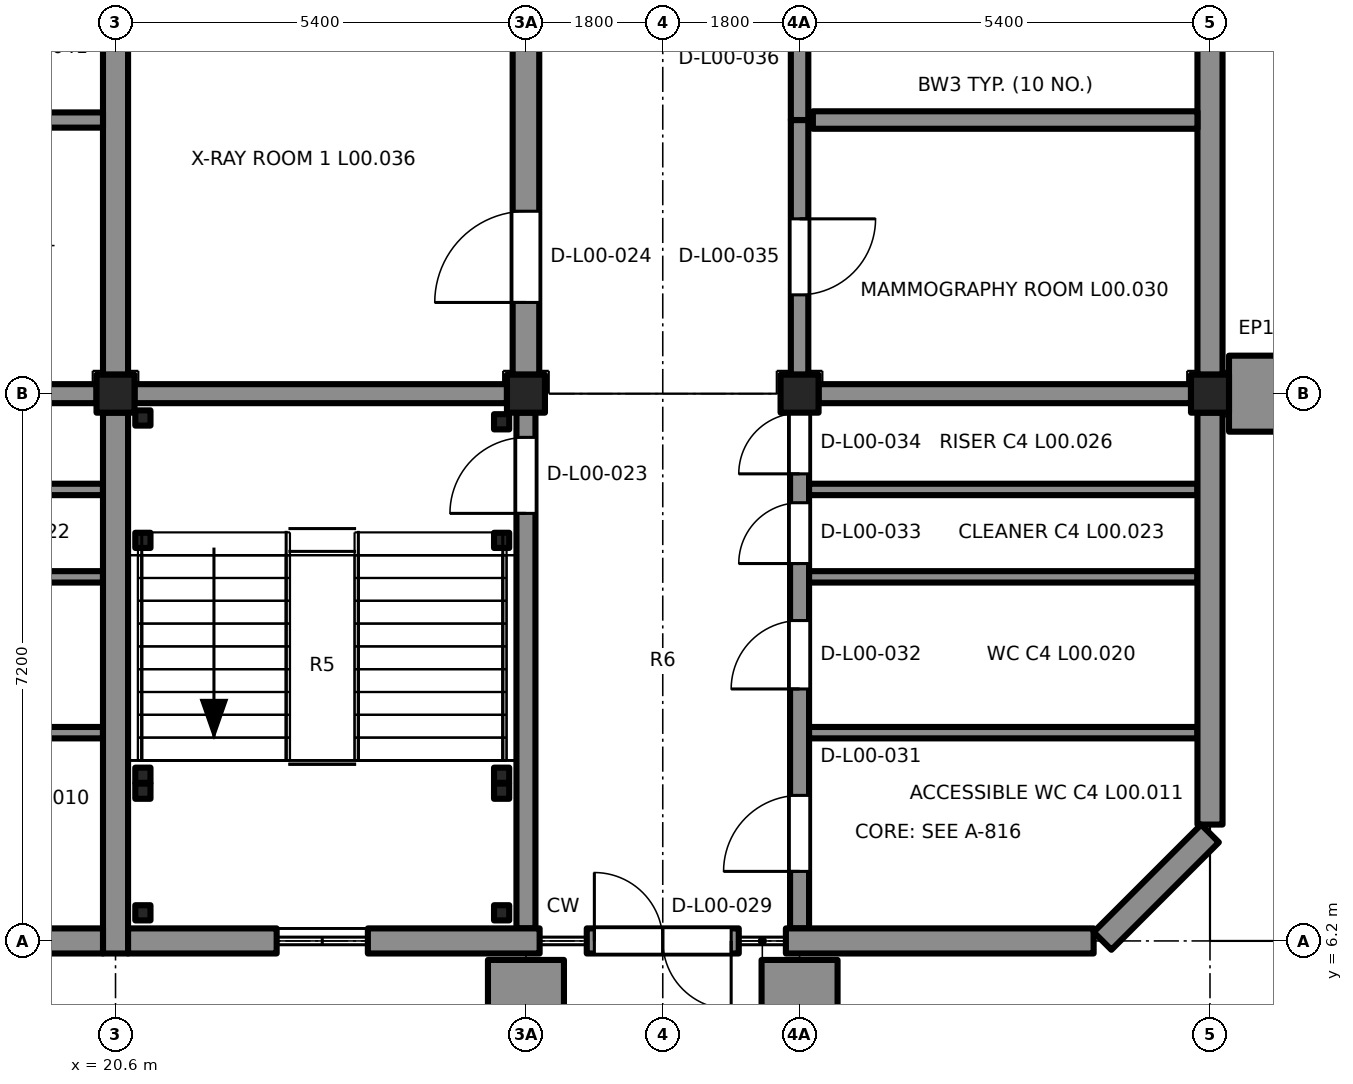
"""IFC4 building model, lengths in metres.
Left out: names, types, materials, properties, quantities, classifications, styles, units other than length and angle.
Written with IfcOpenShell. Run it as: python <this file> out.ifc"""

import sys

from ifc_helpers import new_model, si_unit, direction, frame, frame_2d, origin, origin_2d, place, context, subcontext, project, spatial, rectangle, extrude, element, fill, save


model = new_model("IFC4")
c1 = context("Model", 3, precision=1e-05, world=origin(), true_north=direction((0.0, 1.0)))
c2 = subcontext(c1, "Body", "Model", "MODEL_VIEW")
j1 = project(units=[si_unit("LENGTHUNIT", "METRE"), si_unit("PLANEANGLEUNIT", "RADIAN")], contexts=[c1])
p1 = place(None, origin())
s1 = spatial("IfcSite", under=j1, at=p1, CompositionType="ELEMENT")
p2 = place(p1, origin())
s2 = spatial("IfcBuilding", under=s1, at=p2, CompositionType="ELEMENT")
p3 = place(p2, origin())
s3 = spatial("IfcBuildingStorey", under=s2, at=p3, CompositionType="ELEMENT", Elevation=0.0)
for number, where, z_axis, x_axis in (
    (1, (20.6, 13.4, -0.2), (0.0, 0.0, 1.0), (1.0, 0.0, 0.0)),
    (2, (26.0, 13.4, -0.2), (0.0, 0.0, 1.0), (1.0, 0.0, 0.0)),
    (3, (29.6, 13.4, -0.2), (0.0, 0.0, 1.0), (1.0, 0.0, 0.0)),
    (4, (35.0, 13.4, -0.2), (0.0, 0.0, 1.0), (1.0, 0.0, 0.0)),
):
    element("IfcColumn", number, at=place(p3, frame(where, z_axis=z_axis, x_axis=x_axis)), inside=s3, PredefinedType="COLUMN", context=c2, shape_type="SweptSolid", body=[
        extrude(rectangle(XDim=0.5, YDim=0.5, at=origin_2d()), origin(), (0.0, 0.0, 1.0), 5.45),
    ])
p4 = place(p3, frame((15.45, 13.4, 0.0), z_axis=(0.0, 0.0, 1.0), x_axis=(1.0, 0.0, 0.0)))
e5 = element("IfcWall", 5, at=p4, inside=s3, PredefinedType="SHEAR", context=c2, shape_type="SweptSolid", body=[
    extrude(rectangle(XDim=4.9, YDim=0.25, at=frame_2d((2.45, 0.0))), origin(), (0.0, 0.0, 1.0), 6.05),
])
for number, where, z_axis, x_axis in (
    (6, (15.325, 8.94, 0.0), (0.0, 0.0, 1.0), (1.0, 0.0, 0.0)),
    (7, (15.325, 10.99, 0.0), (0.0, 0.0, 1.0), (1.0, 0.0, 0.0)),
    (8, (15.325, 12.14, 0.0), (0.0, 0.0, 1.0), (1.0, 0.0, 0.0)),
):
    element("IfcWall", number, at=place(p3, frame(where, z_axis=z_axis, x_axis=x_axis)), inside=s3, PredefinedType="PARTITIONING", context=c2, shape_type="SweptSolid", body=[
        extrude(rectangle(XDim=5.11, YDim=0.15, at=frame_2d((2.555, 0.0))), origin(), (0.0, 0.0, 1.0), 6.05),
    ])
p5 = place(p3, frame((26.0, 6.365, 0.0), z_axis=(0.0, 0.0, 1.0), x_axis=(0.0, 1.0, 0.0)))
e9 = element("IfcWall", 9, at=p5, inside=s3, PredefinedType="SHEAR", context=c2, shape_type="SweptSolid", body=[
    extrude(rectangle(XDim=6.785, YDim=0.25, at=frame_2d((3.393, 0.0))), origin(), (0.0, 0.0, 1.0), 6.05),
])
p6 = place(p5, frame((5.46, 0.0, 0.0)))
e10 = element("IfcOpeningElement", 10, at=p6, cuts=e9, PredefinedType="OPENING", context=c2, shape_type="SweptSolid", body=[
    extrude(rectangle(XDim=1.0, YDim=2.1, at=frame_2d((0.5, 1.05))), frame((0.0, 0.135, 0.0), z_axis=(0.0, -1.0, 0.0), x_axis=(1.0, 0.0, 0.0)), (0.0, 0.0, 1.0), 0.27),
])
p7 = place(p3, frame((20.85, 13.4, 0.0), z_axis=(0.0, 0.0, 1.0), x_axis=(1.0, 0.0, 0.0)))
e11 = element("IfcWall", 11, at=p7, inside=s3, PredefinedType="SHEAR", context=c2, shape_type="SweptSolid", body=[
    extrude(rectangle(XDim=4.9, YDim=0.25, at=frame_2d((2.45, 0.0))), origin(), (0.0, 0.0, 1.0), 6.05),
])
p8 = place(p3, frame((29.6, 6.365, 0.0), z_axis=(0.0, 0.0, 1.0), x_axis=(0.0, 1.0, 0.0)))
e12 = element("IfcWall", 12, at=p8, inside=s3, PredefinedType="SHEAR", context=c2, shape_type="SweptSolid", body=[
    extrude(rectangle(XDim=6.785, YDim=0.25, at=frame_2d((3.393, 0.0))), origin(), (0.0, 0.0, 1.0), 6.05),
])
p9 = place(p8, frame((0.75, 0.0, 0.0)))
e13 = element("IfcOpeningElement", 13, at=p9, cuts=e12, PredefinedType="OPENING", context=c2, shape_type="SweptSolid", body=[
    extrude(rectangle(XDim=1.0, YDim=2.1, at=frame_2d((0.5, 1.05))), frame((0.0, 0.135, 0.0), z_axis=(0.0, -1.0, 0.0), x_axis=(1.0, 0.0, 0.0)), (0.0, 0.0, 1.0), 0.27),
])
p10 = place(p8, frame((3.15, 0.0, 0.0)))
e14 = element("IfcOpeningElement", 14, at=p10, cuts=e12, PredefinedType="OPENING", context=c2, shape_type="SweptSolid", body=[
    extrude(rectangle(XDim=0.9, YDim=2.1, at=frame_2d((0.45, 1.05))), frame((0.0, 0.135, 0.0), z_axis=(0.0, -1.0, 0.0), x_axis=(1.0, 0.0, 0.0)), (0.0, 0.0, 1.0), 0.27),
])
p11 = place(p8, frame((4.8, 0.0, 0.0)))
e15 = element("IfcOpeningElement", 15, at=p11, cuts=e12, PredefinedType="OPENING", context=c2, shape_type="SweptSolid", body=[
    extrude(rectangle(XDim=0.8, YDim=2.1, at=frame_2d((0.4, 1.05))), frame((0.0, 0.135, 0.0), z_axis=(0.0, -1.0, 0.0), x_axis=(1.0, 0.0, 0.0)), (0.0, 0.0, 1.0), 0.27),
])
p12 = place(p8, frame((5.98, 0.0, 0.0)))
e16 = element("IfcOpeningElement", 16, at=p12, cuts=e12, PredefinedType="OPENING", context=c2, shape_type="SweptSolid", body=[
    extrude(rectangle(XDim=0.8, YDim=2.1, at=frame_2d((0.4, 1.05))), frame((0.0, 0.135, 0.0), z_axis=(0.0, -1.0, 0.0), x_axis=(1.0, 0.0, 0.0)), (0.0, 0.0, 1.0), 0.27),
])
p13 = place(p3, frame((29.85, 13.4, 0.0), z_axis=(0.0, 0.0, 1.0), x_axis=(1.0, 0.0, 0.0)))
e17 = element("IfcWall", 17, at=p13, inside=s3, PredefinedType="SHEAR", context=c2, shape_type="SweptSolid", body=[
    extrude(rectangle(XDim=4.9, YDim=0.25, at=frame_2d((2.45, 0.0))), origin(), (0.0, 0.0, 1.0), 6.05),
])
for number, where, z_axis, x_axis in (
    (18, (29.725, 8.94, 0.0), (0.0, 0.0, 1.0), (1.0, 0.0, 0.0)),
    (19, (29.725, 10.99, 0.0), (0.0, 0.0, 1.0), (1.0, 0.0, 0.0)),
    (20, (29.725, 12.14, 0.0), (0.0, 0.0, 1.0), (1.0, 0.0, 0.0)),
):
    element("IfcWall", number, at=place(p3, frame(where, z_axis=z_axis, x_axis=x_axis)), inside=s3, PredefinedType="PARTITIONING", context=c2, shape_type="SweptSolid", body=[
        extrude(rectangle(XDim=5.11, YDim=0.15, at=frame_2d((2.555, 0.0))), origin(), (0.0, 0.0, 1.0), 6.05),
    ])
p14 = place(p3, frame((20.96, 6.57, 0.0), z_axis=(0.0, 0.0, 1.0), x_axis=(1.0, 0.0, 0.0)))
e21 = element("IfcColumn", 21, at=p14, inside=s3, PredefinedType="COLUMN", context=c2, shape_type="SweptSolid", body=[
    extrude(rectangle(XDim=0.2, YDim=0.2, at=origin_2d()), origin(), (0.0, 0.0, 1.0), 6.3),
])
p15 = place(p3, frame((20.96, 8.38, 0.0), z_axis=(0.0, 0.0, 1.0), x_axis=(1.0, 0.0, 0.0)))
e22 = element("IfcColumn", 22, at=p15, inside=s3, PredefinedType="COLUMN", context=c2, shape_type="SweptSolid", body=[
    extrude(rectangle(XDim=0.2, YDim=0.2, at=origin_2d()), origin(), (0.0, 0.0, 1.0), 4.45),
])
p16 = place(p3, frame((25.68, 6.57, 0.0), z_axis=(0.0, 0.0, 1.0), x_axis=(1.0, 0.0, 0.0)))
e23 = element("IfcColumn", 23, at=p16, inside=s3, PredefinedType="COLUMN", context=c2, shape_type="SweptSolid", body=[
    extrude(rectangle(XDim=0.2, YDim=0.2, at=origin_2d()), origin(), (0.0, 0.0, 1.0), 6.3),
])
p17 = place(p3, frame((25.68, 8.38, 0.0), z_axis=(0.0, 0.0, 1.0), x_axis=(1.0, 0.0, 0.0)))
e24 = element("IfcColumn", 24, at=p17, inside=s3, PredefinedType="COLUMN", context=c2, shape_type="SweptSolid", body=[
    extrude(rectangle(XDim=0.2, YDim=0.2, at=origin_2d()), origin(), (0.0, 0.0, 1.0), 4.45),
])
for number, where, z_axis, x_axis in (
    (25, (20.96, 11.47, 0.0), (0.0, 0.0, 1.0), (1.0, 0.0, 0.0)),
    (26, (20.96, 13.08, 0.0), (0.0, 0.0, 1.0), (1.0, 0.0, 0.0)),
    (27, (25.68, 11.47, 0.0), (0.0, 0.0, 1.0), (1.0, 0.0, 0.0)),
    (28, (25.68, 13.03, 0.0), (0.0, 0.0, 1.0), (1.0, 0.0, 0.0)),
):
    element("IfcColumn", number, at=place(p3, frame(where, z_axis=z_axis, x_axis=x_axis)), inside=s3, PredefinedType="COLUMN", context=c2, shape_type="SweptSolid", body=[
        extrude(rectangle(XDim=0.2, YDim=0.2, at=origin_2d()), origin(), (0.0, 0.0, 1.0), 2.95),
    ])
for number, where, z_axis, x_axis in (
    (29, (20.96, 8.17, 0.0), (0.0, 0.0, 1.0), (1.0, 0.0, 0.0)),
    (30, (25.68, 8.17, 0.0), (0.0, 0.0, 1.0), (1.0, 0.0, 0.0)),
):
    element("IfcColumn", number, at=place(p3, frame(where, z_axis=z_axis, x_axis=x_axis)), inside=s3, PredefinedType="COLUMN", context=c2, shape_type="SweptSolid", body=[
        extrude(rectangle(XDim=0.2, YDim=0.2, at=origin_2d()), origin(), (0.0, 0.0, 1.0), 6.3),
    ])
p18 = place(p3, frame((20.6, 13.15, 0.0), z_axis=(0.0, 0.0, 1.0), x_axis=(0.0, -1.0, 0.0)))
e31 = element("IfcWall", 31, at=p18, inside=s3, PredefinedType="SOLIDWALL", context=c2, shape_type="SweptSolid", body=[
    extrude(rectangle(XDim=7.115, YDim=0.33, at=frame_2d((3.558, 0.0))), origin(), (0.0, 0.0, 1.0), 5.25),
])
p19 = place(p3, frame((20.6, 20.35, 0.0), z_axis=(0.0, 0.0, 1.0), x_axis=(0.0, -1.0, 0.0)))
e32 = element("IfcWall", 32, at=p19, inside=s3, PredefinedType="SOLIDWALL", context=c2, shape_type="SweptSolid", body=[
    extrude(rectangle(XDim=6.7, YDim=0.33, at=frame_2d((3.35, 0.0))), origin(), (0.0, 0.0, 1.0), 5.25),
])
p20 = place(p3, frame((20.435, 6.2, 0.0), z_axis=(0.0, 0.0, 1.0), x_axis=(-1.0, 0.0, 0.0)))
e33 = element("IfcWall", 33, at=p20, inside=s3, PredefinedType="SOLIDWALL", context=c2, shape_type="SweptSolid", body=[
    extrude(rectangle(XDim=5.415, YDim=0.33, at=frame_2d((2.708, 0.0))), origin(), (0.0, 0.0, 1.0), 5.5),
])
p21 = place(p3, frame((35.0, 13.15, 0.0), z_axis=(0.0, 0.0, 1.0), x_axis=(0.0, -1.0, 0.0)))
e34 = element("IfcWall", 34, at=p21, inside=s3, PredefinedType="SOLIDWALL", context=c2, shape_type="SweptSolid", body=[
    extrude(rectangle(XDim=5.419, YDim=0.33, at=frame_2d((2.709, 0.0))), origin(), (0.0, 0.0, 1.0), 5.25),
])
p22 = place(p3, frame((35.0, 20.35, 0.0), z_axis=(0.0, 0.0, 1.0), x_axis=(0.0, -1.0, 0.0)))
e35 = element("IfcWall", 35, at=p22, inside=s3, PredefinedType="SOLIDWALL", context=c2, shape_type="SweptSolid", body=[
    extrude(rectangle(XDim=6.7, YDim=0.33, at=frame_2d((3.35, 0.0))), origin(), (0.0, 0.0, 1.0), 5.25),
])
p23 = place(p3, frame((35.625, 13.9, 0.0), z_axis=(0.0, 0.0, 1.0), x_axis=(0.0, -1.0, 0.0)))
e36 = element("IfcWall", 36, at=p23, inside=s3, PredefinedType="SOLIDWALL", context=c2, shape_type="SweptSolid", body=[
    extrude(rectangle(XDim=1.0, YDim=0.75, at=frame_2d((0.5, 0.0))), origin(), (0.0, 0.0, 1.0), 6.3),
])
p24 = place(p3, frame((22.72, 6.2, 0.0), z_axis=(0.0, 0.0, 1.0), x_axis=(-1.0, 0.0, 0.0)))
e37 = element("IfcWall", 37, at=p24, inside=s3, PredefinedType="SOLIDWALL", context=c2, shape_type="SweptSolid", body=[
    extrude(rectangle(XDim=1.955, YDim=0.33, at=frame_2d((0.978, 0.0))), origin(), (0.0, 0.0, 1.0), 5.5),
])
p25 = place(p3, frame((26.18, 6.2, 0.0), z_axis=(0.0, 0.0, 1.0), x_axis=(-1.0, 0.0, 0.0)))
e38 = element("IfcWall", 38, at=p25, inside=s3, PredefinedType="SOLIDWALL", context=c2, shape_type="SweptSolid", body=[
    extrude(rectangle(XDim=2.26, YDim=0.33, at=frame_2d((1.13, 0.0))), origin(), (0.0, 0.0, 1.0), 5.5),
])
p26 = place(p3, frame((28.8, 6.2, 0.0), z_axis=(0.0, 0.0, 1.0), x_axis=(-1.0, 0.0, 0.0)))
e39 = element("IfcWall", 39, at=p26, inside=s3, PredefinedType="SOLIDWALL", context=c2, shape_type="SweptSolid", body=[
    extrude(rectangle(XDim=2.0, YDim=0.33, at=frame_2d((1.0, 0.0))), origin(), (0.0, 0.0, 1.0), 5.5),
])
p27 = place(p26, frame((0.1, 0.0, 0.0)))
e40 = element("IfcOpeningElement", 40, at=p27, cuts=e39, PredefinedType="OPENING", context=c2, shape_type="SweptSolid", body=[
    extrude(rectangle(XDim=1.8, YDim=2.4, at=frame_2d((0.9, 1.2))), frame((0.0, 0.175, 0.0), z_axis=(0.0, -1.0, 0.0), x_axis=(1.0, 0.0, 0.0)), (0.0, 0.0, 1.0), 0.35),
])
p28 = place(p3, frame((33.469, 6.2, 0.0), z_axis=(0.0, 0.0, 1.0), x_axis=(-1.0, 0.0, 0.0)))
e41 = element("IfcWall", 41, at=p28, inside=s3, PredefinedType="SOLIDWALL", context=c2, shape_type="SweptSolid", body=[
    extrude(rectangle(XDim=4.049, YDim=0.33, at=frame_2d((2.024, 0.0))), origin(), (0.0, 0.0, 1.0), 5.5),
])
for number, where, z_axis, x_axis in (
    (42, (26.5, 5.575, 0.0), (0.0, 0.0, 1.0), (-1.0, 0.0, 0.0)),
    (43, (30.1, 5.575, 0.0), (0.0, 0.0, 1.0), (-1.0, 0.0, 0.0)),
):
    element("IfcWall", number, at=place(p3, frame(where, z_axis=z_axis, x_axis=x_axis)), inside=s3, PredefinedType="SOLIDWALL", context=c2, shape_type="SweptSolid", body=[
        extrude(rectangle(XDim=1.0, YDim=0.75, at=frame_2d((0.5, 0.0))), origin(), (0.0, 0.0, 1.0), 6.3),
    ])
p29 = place(p3, frame((35.0, 7.614, 0.0), z_axis=(0.0, 0.0, 1.0), x_axis=(-0.707106781187, -0.707106781187, 0.0)))
e44 = element("IfcWall", 44, at=p29, inside=s3, PredefinedType="SOLIDWALL", context=c2, shape_type="SweptSolid", body=[
    extrude(rectangle(XDim=2.0, YDim=0.33, at=frame_2d((1.0, 0.0))), origin(), (0.0, 0.0, 1.0), 5.5),
])
p30 = place(p3, frame((20.435, 17.0, 0.0), z_axis=(0.0, 0.0, 1.0), x_axis=(-1.0, 0.0, 0.0)))
e45 = element("IfcWall", 45, at=p30, inside=s3, PredefinedType="PARTITIONING", context=c2, shape_type="SweptSolid", body=[
    extrude(rectangle(XDim=5.16, YDim=0.2, at=frame_2d((2.58, 0.0))), origin(), (0.0, 0.0, 1.0), 6.05),
])
p31 = place(p3, frame((26.0, 13.65, 0.0), z_axis=(0.0, 0.0, 1.0), x_axis=(0.0, 1.0, 0.0)))
e46 = element("IfcWall", 46, at=p31, inside=s3, PredefinedType="SOLIDWALL", context=c2, shape_type="SweptSolid", body=[
    extrude(rectangle(XDim=6.7, YDim=0.35, at=frame_2d((3.35, 0.0))), origin(), (0.0, 0.0, 1.0), 5.25),
])
p32 = place(p31, frame((0.95, 0.0, 0.0)))
e47 = element("IfcOpeningElement", 47, at=p32, cuts=e46, PredefinedType="OPENING", context=c2, shape_type="SweptSolid", body=[
    extrude(rectangle(XDim=1.2, YDim=2.1, at=frame_2d((0.6, 1.05))), frame((0.0, 0.185, 0.0), z_axis=(0.0, -1.0, 0.0), x_axis=(1.0, 0.0, 0.0)), (0.0, 0.0, 1.0), 0.37),
])
p33 = place(p3, frame((29.6, 17.0, 0.0), z_axis=(0.0, 0.0, 1.0), x_axis=(0.0, -1.0, 0.0)))
e48 = element("IfcWall", 48, at=p33, inside=s3, PredefinedType="SOLIDWALL", context=c2, shape_type="SweptSolid", body=[
    extrude(rectangle(XDim=3.35, YDim=0.23, at=frame_2d((1.675, 0.0))), origin(), (0.0, 0.0, 1.0), 5.25),
])
p34 = place(p33, frame((1.3, 0.0, 0.0)))
e49 = element("IfcOpeningElement", 49, at=p34, cuts=e48, PredefinedType="OPENING", context=c2, shape_type="SweptSolid", body=[
    extrude(rectangle(XDim=1.0, YDim=2.1, at=frame_2d((0.5, 1.05))), frame((0.0, 0.125, 0.0), z_axis=(0.0, -1.0, 0.0), x_axis=(1.0, 0.0, 0.0)), (0.0, 0.0, 1.0), 0.25),
])
p35 = place(p3, frame((29.6, 20.35, 0.0), z_axis=(0.0, 0.0, 1.0), x_axis=(0.0, -1.0, 0.0)))
e50 = element("IfcWall", 50, at=p35, inside=s3, PredefinedType="SOLIDWALL", context=c2, shape_type="SweptSolid", body=[
    extrude(rectangle(XDim=3.35, YDim=0.23, at=frame_2d((1.675, 0.0))), origin(), (0.0, 0.0, 1.0), 5.25),
])
p36 = place(p35, frame((1.05, 0.0, 0.0)))
e51 = element("IfcOpeningElement", 51, at=p36, cuts=e50, PredefinedType="OPENING", context=c2, shape_type="SweptSolid", body=[
    extrude(rectangle(XDim=1.0, YDim=2.1, at=frame_2d((0.5, 1.05))), frame((0.0, 0.125, 0.0), z_axis=(0.0, -1.0, 0.0), x_axis=(1.0, 0.0, 0.0)), (0.0, 0.0, 1.0), 0.25),
])
p37 = place(p3, frame((34.835, 17.0, 0.0), z_axis=(0.0, 0.0, 1.0), x_axis=(-1.0, 0.0, 0.0)))
e52 = element("IfcWall", 52, at=p37, inside=s3, PredefinedType="SOLIDWALL", context=c2, shape_type="SweptSolid", body=[
    extrude(rectangle(XDim=5.06, YDim=0.23, at=frame_2d((2.53, 0.0))), origin(), (0.0, 0.0, 1.0), 6.05),
])
p38 = place(p6, origin())
e53 = element("IfcDoor", 53, at=p38, inside=s3, OperationType="SINGLE_SWING_RIGHT", PredefinedType="DOOR", context=c2, shape_type="SweptSolid", body=[
    extrude(rectangle(XDim=1.0, YDim=2.1, at=frame_2d((0.5, 1.05))), frame((0.0, 0.025, 0.0), z_axis=(0.0, -1.0, 0.0), x_axis=(1.0, 0.0, 0.0)), (0.0, 0.0, 1.0), 0.05),
])
fill(e10, e53)
p39 = place(p9, origin())
e54 = element("IfcDoor", 54, at=p39, inside=s3, OperationType="SINGLE_SWING_LEFT", PredefinedType="DOOR", context=c2, shape_type="SweptSolid", body=[
    extrude(rectangle(XDim=1.0, YDim=2.1, at=frame_2d((0.5, 1.05))), frame((0.0, 0.025, 0.0), z_axis=(0.0, -1.0, 0.0), x_axis=(1.0, 0.0, 0.0)), (0.0, 0.0, 1.0), 0.05),
])
fill(e13, e54)
p40 = place(p10, origin())
e55 = element("IfcDoor", 55, at=p40, inside=s3, OperationType="SINGLE_SWING_LEFT", PredefinedType="DOOR", context=c2, shape_type="SweptSolid", body=[
    extrude(rectangle(XDim=0.9, YDim=2.1, at=frame_2d((0.45, 1.05))), frame((0.0, 0.025, 0.0), z_axis=(0.0, -1.0, 0.0), x_axis=(1.0, 0.0, 0.0)), (0.0, 0.0, 1.0), 0.05),
])
fill(e14, e55)
p41 = place(p11, origin())
e56 = element("IfcDoor", 56, at=p41, inside=s3, OperationType="SINGLE_SWING_LEFT", PredefinedType="DOOR", context=c2, shape_type="SweptSolid", body=[
    extrude(rectangle(XDim=0.8, YDim=2.1, at=frame_2d((0.4, 1.05))), frame((0.0, 0.025, 0.0), z_axis=(0.0, -1.0, 0.0), x_axis=(1.0, 0.0, 0.0)), (0.0, 0.0, 1.0), 0.05),
])
fill(e15, e56)
p42 = place(p12, origin())
e57 = element("IfcDoor", 57, at=p42, inside=s3, OperationType="SINGLE_SWING_LEFT", PredefinedType="DOOR", context=c2, shape_type="SweptSolid", body=[
    extrude(rectangle(XDim=0.8, YDim=2.1, at=frame_2d((0.4, 1.05))), frame((0.0, 0.025, 0.0), z_axis=(0.0, -1.0, 0.0), x_axis=(1.0, 0.0, 0.0)), (0.0, 0.0, 1.0), 0.05),
])
fill(e16, e57)
p43 = place(p27, origin())
e58 = element("IfcDoor", 58, at=p43, inside=s3, OperationType="DOUBLE_DOOR_SINGLE_SWING", PredefinedType="DOOR", context=c2, shape_type="SweptSolid", body=[
    extrude(rectangle(XDim=1.8, YDim=2.4, at=frame_2d((0.9, 1.2))), frame((0.0, 0.025, 0.0), z_axis=(0.0, -1.0, 0.0), x_axis=(1.0, 0.0, 0.0)), (0.0, 0.0, 1.0), 0.05),
])
fill(e40, e58)
p44 = place(p32, origin())
e59 = element("IfcDoor", 59, at=p44, inside=s3, OperationType="SINGLE_SWING_LEFT", PredefinedType="DOOR", context=c2, shape_type="SweptSolid", body=[
    extrude(rectangle(XDim=1.2, YDim=2.1, at=frame_2d((0.6, 1.05))), frame((0.0, 0.025, 0.0), z_axis=(0.0, -1.0, 0.0), x_axis=(1.0, 0.0, 0.0)), (0.0, 0.0, 1.0), 0.05),
])
fill(e47, e59)
p45 = place(p34, origin())
e60 = element("IfcDoor", 60, at=p45, inside=s3, OperationType="SINGLE_SWING_RIGHT", PredefinedType="DOOR", context=c2, shape_type="SweptSolid", body=[
    extrude(rectangle(XDim=1.0, YDim=2.1, at=frame_2d((0.5, 1.05))), frame((0.0, 0.025, 0.0), z_axis=(0.0, -1.0, 0.0), x_axis=(1.0, 0.0, 0.0)), (0.0, 0.0, 1.0), 0.05),
])
fill(e49, e60)
save(model, sys.argv[1])
